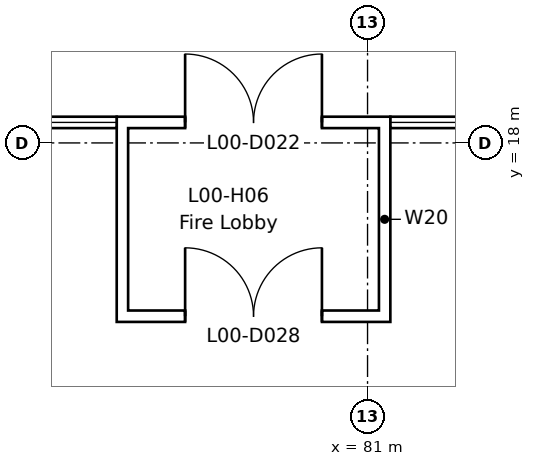
"""IFC4 building model, lengths in metres.
Left out: names, types, materials, properties, quantities, classifications, styles, units other than length and angle.
Written with IfcOpenShell. Run it as: python <this file> out.ifc"""

import sys

from ifc_helpers import new_model, si_unit, direction, frame, frame_2d, origin, place, context, subcontext, project, spatial, rectangle, extrude, element, fill, save


model = new_model("IFC4")
c1 = context("Model", 3, precision=1e-05, world=origin(), true_north=direction((0.0, 1.0)))
c2 = subcontext(c1, "Body", "Model", "MODEL_VIEW")
j1 = project(units=[si_unit("LENGTHUNIT", "METRE"), si_unit("PLANEANGLEUNIT", "RADIAN")], contexts=[c1])
p1 = place(None, origin())
s1 = spatial("IfcSite", under=j1, at=p1, CompositionType="ELEMENT")
p2 = place(p1, origin())
s2 = spatial("IfcBuilding", under=s1, at=p2, CompositionType="ELEMENT")
p3 = place(p2, origin())
s3 = spatial("IfcBuildingStorey", under=s2, at=p3, CompositionType="ELEMENT", Elevation=0.0)
p4 = place(p3, frame((77.7, 18.27, 0.0), z_axis=(0.0, 0.0, 1.0), x_axis=(1.0, 0.0, 0.0)))
e1 = element("IfcWall", 1, at=p4, inside=s3, PredefinedType="STANDARD", context=c2, shape_type="SweptSolid", body=[
    extrude(rectangle(XDim=3.6, YDim=0.15, at=frame_2d((1.8, 0.0))), origin(), (0.0, 0.0, 1.0), 4.8),
])
p5 = place(p4, frame((0.9, 0.0, 0.0)))
e2 = element("IfcOpeningElement", 2, at=p5, cuts=e1, PredefinedType="OPENING", context=c2, shape_type="SweptSolid", body=[
    extrude(rectangle(XDim=1.8, YDim=2.4, at=frame_2d((0.9, 1.2))), frame((0.0, 0.085, 0.0), z_axis=(0.0, -1.0, 0.0), x_axis=(1.0, 0.0, 0.0)), (0.0, 0.0, 1.0), 0.17),
])
for number, where, z_axis, x_axis in (
    (3, (77.775, 15.795, 0.0), (0.0, 0.0, 1.0), (0.0, 1.0, 0.0)),
    (4, (81.225, 15.795, 0.0), (0.0, 0.0, 1.0), (0.0, 1.0, 0.0)),
):
    element("IfcWall", number, at=place(p3, frame(where, z_axis=z_axis, x_axis=x_axis)), inside=s3, PredefinedType="STANDARD", context=c2, shape_type="SweptSolid", body=[
        extrude(rectangle(XDim=2.4, YDim=0.15, at=frame_2d((1.2, 0.0))), origin(), (0.0, 0.0, 1.0), 3.0),
    ])
p6 = place(p3, frame((77.7, 15.72, 0.0), z_axis=(0.0, 0.0, 1.0), x_axis=(1.0, 0.0, 0.0)))
e5 = element("IfcWall", 5, at=p6, inside=s3, PredefinedType="STANDARD", context=c2, shape_type="SweptSolid", body=[
    extrude(rectangle(XDim=3.6, YDim=0.15, at=frame_2d((1.8, 0.0))), origin(), (0.0, 0.0, 1.0), 3.0),
])
p7 = place(p6, frame((0.9, 0.0, 0.0)))
e6 = element("IfcOpeningElement", 6, at=p7, cuts=e5, PredefinedType="OPENING", context=c2, shape_type="SweptSolid", body=[
    extrude(rectangle(XDim=1.8, YDim=2.4, at=frame_2d((0.9, 1.2))), frame((0.0, 0.085, 0.0), z_axis=(0.0, -1.0, 0.0), x_axis=(1.0, 0.0, 0.0)), (0.0, 0.0, 1.0), 0.17),
])
p8 = place(p5, origin())
e7 = element("IfcDoor", 7, at=p8, inside=s3, OperationType="DOUBLE_DOOR_SINGLE_SWING", PredefinedType="DOOR", context=c2, shape_type="SweptSolid", body=[
    extrude(rectangle(XDim=1.8, YDim=2.4, at=frame_2d((0.9, 1.2))), frame((0.0, 0.025, 0.0), z_axis=(0.0, -1.0, 0.0), x_axis=(1.0, 0.0, 0.0)), (0.0, 0.0, 1.0), 0.05),
])
fill(e2, e7)
p9 = place(p7, origin())
e8 = element("IfcDoor", 8, at=p9, inside=s3, OperationType="DOUBLE_DOOR_SINGLE_SWING", PredefinedType="DOOR", context=c2, shape_type="SweptSolid", body=[
    extrude(rectangle(XDim=1.8, YDim=2.4, at=frame_2d((0.9, 1.2))), frame((0.0, 0.025, 0.0), z_axis=(0.0, -1.0, 0.0), x_axis=(1.0, 0.0, 0.0)), (0.0, 0.0, 1.0), 0.05),
])
fill(e6, e8)
save(model, sys.argv[1])
